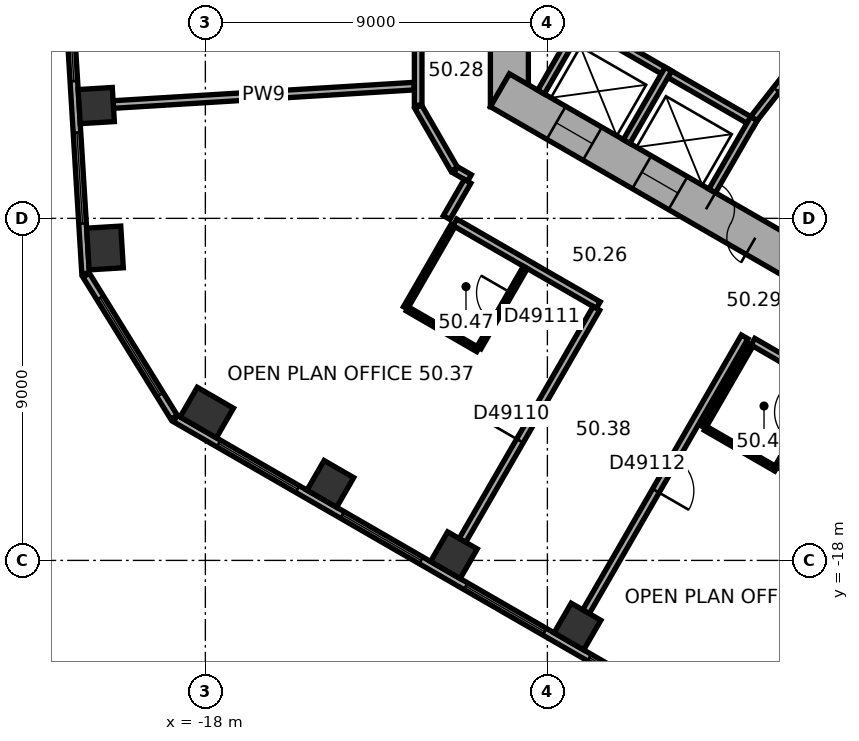
"""IFC4 building model, lengths in metres.
Left out: names, types, materials, properties, quantities, classifications, styles, units other than length and angle.
Written with IfcOpenShell. Run it as: python <this file> out.ifc"""

import sys

from ifc_helpers import new_model, si_unit, direction, frame, frame_2d, origin, origin_2d, place, context, subcontext, project, spatial, rectangle, extrude, element, fill, save


model = new_model("IFC4")
c1 = context("Model", 3, precision=1e-05, world=origin(), true_north=direction((0.0, 1.0)))
c2 = subcontext(c1, "Body", "Model", "MODEL_VIEW")
j1 = project(units=[si_unit("LENGTHUNIT", "METRE"), si_unit("PLANEANGLEUNIT", "RADIAN")], contexts=[c1])
p1 = place(None, origin())
s1 = spatial("IfcSite", under=j1, at=p1, CompositionType="ELEMENT")
p2 = place(p1, origin())
s2 = spatial("IfcBuilding", under=s1, at=p2, CompositionType="ELEMENT")
p3 = place(p2, frame((0.0, 0.0, 202.1)))
s3 = spatial("IfcBuildingStorey", under=s2, at=p3, CompositionType="ELEMENT", Elevation=202.1)
p4 = place(p3, frame((-20.871, -6.032, 0.0), z_axis=(0.0, 0.0, 1.0), x_axis=(0.061048539535, -0.998134798422, 0.0)))
e1 = element("IfcColumn", 1, at=p4, inside=s3, PredefinedType="COLUMN", context=c2, shape_type="SweptSolid", body=[
    extrude(rectangle(XDim=0.9, YDim=0.9, at=origin_2d()), origin(), (0.0, 0.0, 1.0), 3.7),
])
for number, where, z_axis, x_axis in (
    (2, (-20.642, -9.779, 0.0), (0.0, 0.0, 1.0), (0.061, -0.998, 0.0)),
    (3, (-17.962, -14.109, 0.0), (0.0, 0.0, 1.0), (0.866, -0.5, 0.0)),
):
    element("IfcColumn", number, at=place(p3, frame(where, z_axis=z_axis, x_axis=x_axis)), inside=s3, PredefinedType="COLUMN", context=c2, shape_type="SweptSolid", body=[
        extrude(rectangle(XDim=1.1, YDim=0.9, at=origin_2d()), origin(), (0.0, 0.0, 1.0), 3.7),
    ])
for number, where, z_axis, x_axis in (
    (4, (-14.711, -15.986, 0.0), (0.0, 0.0, 1.0), (0.866, -0.5, 0.0)),
    (5, (-11.46, -17.863, 0.0), (0.0, 0.0, 1.0), (0.866, -0.5, 0.0)),
    (6, (-8.208, -19.74, 0.0), (0.0, 0.0, 1.0), (0.866, -0.5, 0.0)),
):
    element("IfcColumn", number, at=place(p3, frame(where, z_axis=z_axis, x_axis=x_axis)), inside=s3, PredefinedType="COLUMN", context=c2, shape_type="SweptSolid", body=[
        extrude(rectangle(XDim=0.9, YDim=0.9, at=origin_2d()), origin(), (0.0, 0.0, 1.0), 3.7),
    ])
p5 = place(p3, frame((-10.0, 6.062, 0.0), z_axis=(0.0, 0.0, 1.0), x_axis=(0.0, -1.0, 0.0)))
e7 = element("IfcWall", 7, at=p5, inside=s3, PredefinedType="SHEAR", context=c2, shape_type="SweptSolid", body=[
    extrude(rectangle(XDim=12.125, YDim=1.0, at=frame_2d((6.062, 0.0))), origin(), (0.0, 0.0, 1.0), 3.7),
])
p6 = place(p5, frame((5.212, 0.0, 0.0)))
e8 = element("IfcOpeningElement", 8, at=p6, cuts=e7, PredefinedType="OPENING", context=c2, shape_type="SweptSolid", body=[
    extrude(rectangle(XDim=1.1, YDim=2.1, at=frame_2d((0.55, 1.05))), frame((0.0, 0.51, 0.0), z_axis=(0.0, -1.0, 0.0), x_axis=(1.0, 0.0, 0.0)), (0.0, 0.0, 1.0), 1.02),
])
p7 = place(p5, frame((7.812, 0.0, 0.0)))
e9 = element("IfcOpeningElement", 9, at=p7, cuts=e7, PredefinedType="OPENING", context=c2, shape_type="SweptSolid", body=[
    extrude(rectangle(XDim=1.1, YDim=2.1, at=frame_2d((0.55, 1.05))), frame((0.0, 0.51, 0.0), z_axis=(0.0, -1.0, 0.0), x_axis=(1.0, 0.0, 0.0)), (0.0, 0.0, 1.0), 1.02),
])
p8 = place(p3, frame((-10.25, -5.629, 0.0), z_axis=(0.0, 0.0, 1.0), x_axis=(0.866022616891, -0.50000482701, 0.0)))
e10 = element("IfcWall", 10, at=p8, inside=s3, PredefinedType="SHEAR", context=c2, shape_type="SweptSolid", body=[
    extrude(rectangle(XDim=12.125, YDim=1.0, at=frame_2d((6.062, 0.0))), origin(), (0.0, 0.0, 1.0), 3.7),
])
p9 = place(p8, frame((6.262, 0.0, 0.0)))
e11 = element("IfcOpeningElement", 11, at=p9, cuts=e10, PredefinedType="OPENING", context=c2, shape_type="SweptSolid", body=[
    extrude(rectangle(XDim=1.5, YDim=2.1, at=frame_2d((0.75, 1.05))), frame((0.0, 0.51, 0.0), z_axis=(0.0, -1.0, 0.0), x_axis=(1.0, 0.0, 0.0)), (0.0, 0.0, 1.0), 1.02),
])
p10 = place(p8, frame((1.712, 0.0, 0.0)))
e12 = element("IfcOpeningElement", 12, at=p10, cuts=e10, PredefinedType="OPENING", context=c2, shape_type="SweptSolid", body=[
    extrude(rectangle(XDim=1.1, YDim=2.1, at=frame_2d((0.55, 1.05))), frame((0.0, 0.51, 0.0), z_axis=(0.0, -1.0, 0.0), x_axis=(1.0, 0.0, 0.0)), (0.0, 0.0, 1.0), 1.02),
])
p11 = place(p8, frame((4.312, 0.0, 0.0)))
e13 = element("IfcOpeningElement", 13, at=p11, cuts=e10, PredefinedType="OPENING", context=c2, shape_type="SweptSolid", body=[
    extrude(rectangle(XDim=1.1, YDim=2.1, at=frame_2d((0.55, 1.05))), frame((0.0, 0.51, 0.0), z_axis=(0.0, -1.0, 0.0), x_axis=(1.0, 0.0, 0.0)), (0.0, 0.0, 1.0), 1.02),
])
p12 = place(p3, frame((-22.375, 9.557, 0.0), z_axis=(0.0, 0.0, 1.0), x_axis=(0.061036015339, -0.998135564356, 0.0)))
e14 = element("IfcWall", 14, at=p12, inside=s3, PredefinedType="STANDARD", context=c2, shape_type="SweptSolid", body=[
    extrude(rectangle(XDim=20.044, YDim=0.2, at=frame_2d((10.022, 0.0))), origin(), (0.0, 0.0, 1.0), 3.7),
])
p13 = place(p12, frame((1.313, 0.0, 0.9)))
e15 = element("IfcOpeningElement", 15, at=p13, cuts=e14, PredefinedType="OPENING", context=c2, shape_type="SweptSolid", body=[
    extrude(rectangle(XDim=2.4, YDim=2.0, at=frame_2d((1.2, 1.0))), frame((0.0, 0.11, 0.0), z_axis=(0.0, -1.0, 0.0), x_axis=(1.0, 0.0, 0.0)), (0.0, 0.0, 1.0), 0.22),
])
p14 = place(p12, frame((5.067, 0.0, 0.9)))
e16 = element("IfcOpeningElement", 16, at=p14, cuts=e14, PredefinedType="OPENING", context=c2, shape_type="SweptSolid", body=[
    extrude(rectangle(XDim=2.4, YDim=2.0, at=frame_2d((1.2, 1.0))), frame((0.0, 0.11, 0.0), z_axis=(0.0, -1.0, 0.0), x_axis=(1.0, 0.0, 0.0)), (0.0, 0.0, 1.0), 0.22),
])
p15 = place(p12, frame((8.821, 0.0, 0.9)))
e17 = element("IfcOpeningElement", 17, at=p15, cuts=e14, PredefinedType="OPENING", context=c2, shape_type="SweptSolid", body=[
    extrude(rectangle(XDim=2.4, YDim=2.0, at=frame_2d((1.2, 1.0))), frame((0.0, 0.11, 0.0), z_axis=(0.0, -1.0, 0.0), x_axis=(1.0, 0.0, 0.0)), (0.0, 0.0, 1.0), 0.22),
])
p16 = place(p12, frame((12.575, 0.0, 0.9)))
e18 = element("IfcOpeningElement", 18, at=p16, cuts=e14, PredefinedType="OPENING", context=c2, shape_type="SweptSolid", body=[
    extrude(rectangle(XDim=2.4, YDim=2.0, at=frame_2d((1.2, 1.0))), frame((0.0, 0.11, 0.0), z_axis=(0.0, -1.0, 0.0), x_axis=(1.0, 0.0, 0.0)), (0.0, 0.0, 1.0), 0.22),
])
p17 = place(p12, frame((16.329, 0.0, 0.9)))
e19 = element("IfcOpeningElement", 19, at=p17, cuts=e14, PredefinedType="OPENING", context=c2, shape_type="SweptSolid", body=[
    extrude(rectangle(XDim=2.4, YDim=2.0, at=frame_2d((1.2, 1.0))), frame((0.0, 0.11, 0.0), z_axis=(0.0, -1.0, 0.0), x_axis=(1.0, 0.0, 0.0)), (0.0, 0.0, 1.0), 0.22),
])
p18 = place(p3, frame((-21.137, -10.496, 0.0), z_axis=(0.0, 0.0, 1.0), x_axis=(0.526178661629, -0.850374044786, 0.0)))
e20 = element("IfcWall", 20, at=p18, inside=s3, PredefinedType="STANDARD", context=c2, shape_type="SweptSolid", body=[
    extrude(rectangle(XDim=4.395, YDim=0.2, at=frame_2d((2.197, 0.0))), origin(), (0.0, 0.0, 1.0), 3.7),
])
p19 = place(p18, frame((0.698, 0.0, 0.9)))
e21 = element("IfcOpeningElement", 21, at=p19, cuts=e20, PredefinedType="OPENING", context=c2, shape_type="SweptSolid", body=[
    extrude(rectangle(XDim=3.0, YDim=2.0, at=frame_2d((1.5, 1.0))), frame((0.0, 0.11, 0.0), z_axis=(0.0, -1.0, 0.0), x_axis=(1.0, 0.0, 0.0)), (0.0, 0.0, 1.0), 0.22),
])
p20 = place(p3, frame((-18.789, -14.267, 0.0), z_axis=(0.0, 0.0, 1.0), x_axis=(0.866023315909, -0.500003616288, 0.0)))
e22 = element("IfcWall", 22, at=p20, inside=s3, PredefinedType="STANDARD", context=c2, shape_type="SweptSolid", body=[
    extrude(rectangle(XDim=20.044, YDim=0.2, at=frame_2d((10.022, 0.0))), origin(), (0.0, 0.0, 1.0), 3.7),
])
p21 = place(p20, frame((1.314, 0.0, 0.9)))
e23 = element("IfcOpeningElement", 23, at=p21, cuts=e22, PredefinedType="OPENING", context=c2, shape_type="SweptSolid", body=[
    extrude(rectangle(XDim=2.4, YDim=2.0, at=frame_2d((1.2, 1.0))), frame((0.0, 0.11, 0.0), z_axis=(0.0, -1.0, 0.0), x_axis=(1.0, 0.0, 0.0)), (0.0, 0.0, 1.0), 0.22),
])
p22 = place(p20, frame((5.069, 0.0, 0.9)))
e24 = element("IfcOpeningElement", 24, at=p22, cuts=e22, PredefinedType="OPENING", context=c2, shape_type="SweptSolid", body=[
    extrude(rectangle(XDim=2.4, YDim=2.0, at=frame_2d((1.2, 1.0))), frame((0.0, 0.11, 0.0), z_axis=(0.0, -1.0, 0.0), x_axis=(1.0, 0.0, 0.0)), (0.0, 0.0, 1.0), 0.22),
])
p23 = place(p20, frame((8.823, 0.0, 0.9)))
e25 = element("IfcOpeningElement", 25, at=p23, cuts=e22, PredefinedType="OPENING", context=c2, shape_type="SweptSolid", body=[
    extrude(rectangle(XDim=2.4, YDim=2.0, at=frame_2d((1.2, 1.0))), frame((0.0, 0.11, 0.0), z_axis=(0.0, -1.0, 0.0), x_axis=(1.0, 0.0, 0.0)), (0.0, 0.0, 1.0), 0.22),
])
p24 = place(p20, frame((12.577, 0.0, 0.9)))
e26 = element("IfcOpeningElement", 26, at=p24, cuts=e22, PredefinedType="OPENING", context=c2, shape_type="SweptSolid", body=[
    extrude(rectangle(XDim=2.4, YDim=2.0, at=frame_2d((1.2, 1.0))), frame((0.0, 0.11, 0.0), z_axis=(0.0, -1.0, 0.0), x_axis=(1.0, 0.0, 0.0)), (0.0, 0.0, 1.0), 0.22),
])
p25 = place(p20, frame((16.331, 0.0, 0.9)))
e27 = element("IfcOpeningElement", 27, at=p25, cuts=e22, PredefinedType="OPENING", context=c2, shape_type="SweptSolid", body=[
    extrude(rectangle(XDim=2.4, YDim=2.0, at=frame_2d((1.2, 1.0))), frame((0.0, 0.11, 0.0), z_axis=(0.0, -1.0, 0.0), x_axis=(1.0, 0.0, 0.0)), (0.0, 0.0, 1.0), 0.22),
])
p26 = place(p3, frame((-8.203, -3.809, 0.0), z_axis=(0.0, 0.0, 1.0), x_axis=(0.866028230842, -0.499995103361, 0.0)))
e28 = element("IfcWall", 28, at=p26, inside=s3, PredefinedType="PARTITIONING", context=c2, shape_type="SweptSolid", body=[
    extrude(rectangle(XDim=5.4, YDim=0.2, at=frame_2d((2.7, 0.0))), origin(), (0.0, 0.0, 1.0), 3.35),
])
for number, where, z_axis, x_axis in (
    (29, (-8.067, -3.772, 0.0), (0.0, 0.0, 1.0), (-0.5, -0.866, 0.0)),
    (30, (-5.815, -5.072, 0.0), (0.0, 0.0, 1.0), (-0.5, -0.866, 0.0)),
):
    element("IfcWall", number, at=place(p3, frame(where, z_axis=z_axis, x_axis=x_axis)), inside=s3, PredefinedType="PARTITIONING", context=c2, shape_type="SweptSolid", body=[
        extrude(rectangle(XDim=2.2, YDim=0.2, at=frame_2d((1.1, 0.0))), origin(), (0.0, 0.0, 1.0), 3.35),
    ])
p27 = place(p3, frame((-3.563, -6.372, 0.0), z_axis=(0.0, 0.0, 1.0), x_axis=(-0.499994660107, -0.866028486751, 0.0)))
e31 = element("IfcWall", 31, at=p27, inside=s3, PredefinedType="PARTITIONING", context=c2, shape_type="SweptSolid", body=[
    extrude(rectangle(XDim=2.2, YDim=0.2, at=frame_2d((1.1, 0.0))), origin(), (0.0, 0.0, 1.0), 3.35),
])
p28 = place(p3, frame((-1.712, -4.008, 0.0), z_axis=(0.0, 0.0, 1.0), x_axis=(-0.616549420702, -0.787316208287, 0.0)))
e32 = element("IfcWall", 32, at=p28, inside=s3, PredefinedType="PARTITIONING", context=c2, shape_type="SweptSolid", body=[
    extrude(rectangle(XDim=3.002, YDim=0.2, at=frame_2d((1.501, 0.0))), origin(), (0.0, 0.0, 1.0), 3.35),
])
p29 = place(p28, frame((1.15, 0.0, 0.0)))
e33 = element("IfcOpeningElement", 33, at=p29, cuts=e32, PredefinedType="OPENING", context=c2, shape_type="SweptSolid", body=[
    extrude(rectangle(XDim=0.9, YDim=2.1, at=frame_2d((0.45, 1.05))), frame((0.0, 0.11, 0.0), z_axis=(0.0, -1.0, 0.0), x_axis=(1.0, 0.0, 0.0)), (0.0, 0.0, 1.0), 0.22),
])
p30 = place(p3, frame((-20.421, -6.005, 0.0), z_axis=(0.0, 0.0, 1.0), x_axis=(0.998134865741, 0.061047438866, 0.0)))
e34 = element("IfcWall", 34, at=p30, inside=s3, PredefinedType="PARTITIONING", context=c2, shape_type="SweptSolid", body=[
    extrude(rectangle(XDim=7.927, YDim=0.2, at=frame_2d((3.963, 0.0))), origin(), (0.0, 0.0, 1.0), 2.55),
])
p31 = place(p3, frame((-12.735, -11.355, 0.0), z_axis=(0.0, 0.0, 1.0), x_axis=(0.500004234368, 0.866022959057, 0.0)))
e35 = element("IfcWall", 35, at=p31, inside=s3, PredefinedType="PARTITIONING", context=c2, shape_type="SweptSolid", body=[
    extrude(rectangle(XDim=2.5, YDim=0.12, at=frame_2d((1.25, 0.0))), origin(), (0.0, 0.0, 1.0), 3.35),
])
p32 = place(p3, frame((-12.4, -6.062, 0.0), z_axis=(0.0, 0.0, 1.0), x_axis=(0.500022797313, -0.86601224135, 0.0)))
e36 = element("IfcWall", 36, at=p32, inside=s3, PredefinedType="PARTITIONING", context=c2, shape_type="SweptSolid", body=[
    extrude(rectangle(XDim=1.9, YDim=0.2, at=frame_2d((0.95, 0.0))), origin(), (0.0, 0.0, 1.0), 3.35),
])
p33 = place(p3, frame((-12.4, -4.201, 0.0), z_axis=(0.0, 0.0, 1.0), x_axis=(0.0, -1.0, 0.0)))
e37 = element("IfcWall", 37, at=p33, inside=s3, PredefinedType="PARTITIONING", context=c2, shape_type="SweptSolid", body=[
    extrude(rectangle(XDim=1.821, YDim=0.2, at=frame_2d((0.911, 0.0))), origin(), (0.0, 0.0, 1.0), 3.35),
])
p34 = place(p3, frame((-11.435, -9.103, 0.0), z_axis=(0.0, 0.0, 1.0), x_axis=(0.866007399799, -0.500031182522, 0.0)))
e38 = element("IfcWall", 38, at=p34, inside=s3, PredefinedType="PARTITIONING", context=c2, shape_type="SweptSolid", body=[
    extrude(rectangle(XDim=4.358, YDim=0.2, at=frame_2d((2.179, 0.0))), origin(), (0.0, 0.0, 1.0), 3.35),
])
p35 = place(p3, frame((-11.415, -7.728, 0.0), z_axis=(0.0, 0.0, 1.0), x_axis=(0.865915281873, -0.500190688257, 0.0)))
e39 = element("IfcWall", 39, at=p35, inside=s3, PredefinedType="PARTITIONING", context=c2, shape_type="SweptSolid", body=[
    extrude(rectangle(XDim=0.421, YDim=0.2, at=frame_2d((0.21, 0.0))), origin(), (0.0, 0.0, 1.0), 3.35),
])
p36 = place(p3, frame((-11.235, -17.474, 0.0), z_axis=(0.0, 0.0, 1.0), x_axis=(0.500009260695, 0.866020057054, 0.0)))
e40 = element("IfcWall", 40, at=p36, inside=s3, PredefinedType="PARTITIONING", context=c2, shape_type="SweptSolid", body=[
    extrude(rectangle(XDim=7.049, YDim=0.2, at=frame_2d((3.524, 0.0))), origin(), (0.0, 0.0, 1.0), 2.55),
])
p37 = place(p36, frame((3.024, 0.0, 0.0)))
e41 = element("IfcOpeningElement", 41, at=p37, cuts=e40, PredefinedType="OPENING", context=c2, shape_type="SweptSolid", body=[
    extrude(rectangle(XDim=1.0, YDim=2.1, at=frame_2d((0.5, 1.05))), frame((0.0, 0.11, 0.0), z_axis=(0.0, -1.0, 0.0), x_axis=(1.0, 0.0, 0.0)), (0.0, 0.0, 1.0), 0.22),
])
p38 = place(p3, frame((-11.101, -8.025, 0.0), z_axis=(0.0, 0.0, 1.0), x_axis=(-0.500074377092, -0.865982457891, 0.0)))
e42 = element("IfcWall", 42, at=p38, inside=s3, PredefinedType="PARTITIONING", context=c2, shape_type="SweptSolid", body=[
    extrude(rectangle(XDim=1.101, YDim=0.2, at=frame_2d((0.55, 0.0))), origin(), (0.0, 0.0, 1.0), 3.35),
])
p39 = place(p3, frame((-10.829, -12.455, 0.0), z_axis=(0.0, 0.0, 1.0), x_axis=(-0.86600889856, 0.500028586798, 0.0)))
e43 = element("IfcWall", 43, at=p39, inside=s3, PredefinedType="PARTITIONING", context=c2, shape_type="SweptSolid", body=[
    extrude(rectangle(XDim=2.14, YDim=0.12, at=frame_2d((1.07, 0.0))), origin(), (0.0, 0.0, 1.0), 3.35),
])
p40 = place(p3, frame((-9.579, -10.29, 0.0), z_axis=(0.0, 0.0, 1.0), x_axis=(-0.499959183527, -0.866048967903, 0.0)))
e44 = element("IfcWall", 44, at=p40, inside=s3, PredefinedType="PARTITIONING", context=c2, shape_type="SweptSolid", body=[
    extrude(rectangle(XDim=2.44, YDim=0.12, at=frame_2d((1.22, 0.0))), origin(), (0.0, 0.0, 1.0), 3.35),
])
p41 = place(p40, frame((0.77, 0.0, 0.0)))
e45 = element("IfcOpeningElement", 45, at=p41, cuts=e44, PredefinedType="OPENING", context=c2, shape_type="SweptSolid", body=[
    extrude(rectangle(XDim=0.9, YDim=2.1, at=frame_2d((0.45, 1.05))), frame((0.0, 0.07, 0.0), z_axis=(0.0, -1.0, 0.0), x_axis=(1.0, 0.0, 0.0)), (0.0, 0.0, 1.0), 0.14),
])
p42 = place(p3, frame((-7.984, -19.351, 0.0), z_axis=(0.0, 0.0, 1.0), x_axis=(0.500010139422, 0.866019549707, 0.0)))
e46 = element("IfcWall", 46, at=p42, inside=s3, PredefinedType="PARTITIONING", context=c2, shape_type="SweptSolid", body=[
    extrude(rectangle(XDim=8.35, YDim=0.2, at=frame_2d((4.175, 0.0))), origin(), (0.0, 0.0, 1.0), 3.35),
])
p43 = place(p42, frame((3.675, 0.0, 0.0)))
e47 = element("IfcOpeningElement", 47, at=p43, cuts=e46, PredefinedType="OPENING", context=c2, shape_type="SweptSolid", body=[
    extrude(rectangle(XDim=1.0, YDim=2.1, at=frame_2d((0.5, 1.05))), frame((0.0, 0.11, 0.0), z_axis=(0.0, -1.0, 0.0), x_axis=(1.0, 0.0, 0.0)), (0.0, 0.0, 1.0), 0.22),
])
p44 = place(p3, frame((-4.892, -14.496, 0.0), z_axis=(0.0, 0.0, 1.0), x_axis=(0.500004234368, 0.866022959057, 0.0)))
e48 = element("IfcWall", 48, at=p44, inside=s3, PredefinedType="PARTITIONING", context=c2, shape_type="SweptSolid", body=[
    extrude(rectangle(XDim=2.5, YDim=0.12, at=frame_2d((1.25, 0.0))), origin(), (0.0, 0.0, 1.0), 3.35),
])
p45 = place(p3, frame((-3.592, -12.244, 0.0), z_axis=(0.0, 0.0, 1.0), x_axis=(0.866028335764, -0.499994921628, 0.0)))
e49 = element("IfcWall", 49, at=p45, inside=s3, PredefinedType="PARTITIONING", context=c2, shape_type="SweptSolid", body=[
    extrude(rectangle(XDim=3.051, YDim=0.2, at=frame_2d((1.525, 0.0))), origin(), (0.0, 0.0, 1.0), 3.35),
])
p46 = place(p3, frame((-2.987, -15.596, 0.0), z_axis=(0.0, 0.0, 1.0), x_axis=(-0.86600889856, 0.500028586798, 0.0)))
e50 = element("IfcWall", 50, at=p46, inside=s3, PredefinedType="PARTITIONING", context=c2, shape_type="SweptSolid", body=[
    extrude(rectangle(XDim=2.14, YDim=0.12, at=frame_2d((1.07, 0.0))), origin(), (0.0, 0.0, 1.0), 3.35),
])
p47 = place(p3, frame((-1.737, -13.431, 0.0), z_axis=(0.0, 0.0, 1.0), x_axis=(-0.499959183527, -0.866048967903, 0.0)))
e51 = element("IfcWall", 51, at=p47, inside=s3, PredefinedType="PARTITIONING", context=c2, shape_type="SweptSolid", body=[
    extrude(rectangle(XDim=2.44, YDim=0.12, at=frame_2d((1.22, 0.0))), origin(), (0.0, 0.0, 1.0), 3.35),
])
p48 = place(p47, frame((0.77, 0.0, 0.0)))
e52 = element("IfcOpeningElement", 52, at=p48, cuts=e51, PredefinedType="OPENING", context=c2, shape_type="SweptSolid", body=[
    extrude(rectangle(XDim=0.9, YDim=2.1, at=frame_2d((0.45, 1.05))), frame((0.0, 0.07, 0.0), z_axis=(0.0, -1.0, 0.0), x_axis=(1.0, 0.0, 0.0)), (0.0, 0.0, 1.0), 0.14),
])
p49 = place(p16, origin())
e53 = element("IfcWindow", 53, at=p49, inside=s3, PartitioningType="SINGLE_PANEL", PredefinedType="WINDOW", context=c2, shape_type="SweptSolid", body=[
    extrude(rectangle(XDim=2.4, YDim=2.0, at=frame_2d((1.2, 1.0))), frame((0.0, 0.03, 0.0), z_axis=(0.0, -1.0, 0.0), x_axis=(1.0, 0.0, 0.0)), (0.0, 0.0, 1.0), 0.06),
])
fill(e18, e53)
p50 = place(p17, origin())
e54 = element("IfcWindow", 54, at=p50, inside=s3, PartitioningType="SINGLE_PANEL", PredefinedType="WINDOW", context=c2, shape_type="SweptSolid", body=[
    extrude(rectangle(XDim=2.4, YDim=2.0, at=frame_2d((1.2, 1.0))), frame((0.0, 0.03, 0.0), z_axis=(0.0, -1.0, 0.0), x_axis=(1.0, 0.0, 0.0)), (0.0, 0.0, 1.0), 0.06),
])
fill(e19, e54)
p51 = place(p19, origin())
e55 = element("IfcWindow", 55, at=p51, inside=s3, PartitioningType="SINGLE_PANEL", PredefinedType="WINDOW", context=c2, shape_type="SweptSolid", body=[
    extrude(rectangle(XDim=3.0, YDim=2.0, at=frame_2d((1.5, 1.0))), frame((0.0, 0.03, 0.0), z_axis=(0.0, -1.0, 0.0), x_axis=(1.0, 0.0, 0.0)), (0.0, 0.0, 1.0), 0.06),
])
fill(e21, e55)
p52 = place(p21, origin())
e56 = element("IfcWindow", 56, at=p52, inside=s3, PartitioningType="SINGLE_PANEL", PredefinedType="WINDOW", context=c2, shape_type="SweptSolid", body=[
    extrude(rectangle(XDim=2.4, YDim=2.0, at=frame_2d((1.2, 1.0))), frame((0.0, 0.03, 0.0), z_axis=(0.0, -1.0, 0.0), x_axis=(1.0, 0.0, 0.0)), (0.0, 0.0, 1.0), 0.06),
])
fill(e23, e56)
p53 = place(p22, origin())
e57 = element("IfcWindow", 57, at=p53, inside=s3, PartitioningType="SINGLE_PANEL", PredefinedType="WINDOW", context=c2, shape_type="SweptSolid", body=[
    extrude(rectangle(XDim=2.4, YDim=2.0, at=frame_2d((1.2, 1.0))), frame((0.0, 0.03, 0.0), z_axis=(0.0, -1.0, 0.0), x_axis=(1.0, 0.0, 0.0)), (0.0, 0.0, 1.0), 0.06),
])
fill(e24, e57)
p54 = place(p23, origin())
e58 = element("IfcWindow", 58, at=p54, inside=s3, PartitioningType="SINGLE_PANEL", PredefinedType="WINDOW", context=c2, shape_type="SweptSolid", body=[
    extrude(rectangle(XDim=2.4, YDim=2.0, at=frame_2d((1.2, 1.0))), frame((0.0, 0.03, 0.0), z_axis=(0.0, -1.0, 0.0), x_axis=(1.0, 0.0, 0.0)), (0.0, 0.0, 1.0), 0.06),
])
fill(e25, e58)
p55 = place(p24, origin())
e59 = element("IfcWindow", 59, at=p55, inside=s3, PartitioningType="SINGLE_PANEL", PredefinedType="WINDOW", context=c2, shape_type="SweptSolid", body=[
    extrude(rectangle(XDim=2.4, YDim=2.0, at=frame_2d((1.2, 1.0))), frame((0.0, 0.03, 0.0), z_axis=(0.0, -1.0, 0.0), x_axis=(1.0, 0.0, 0.0)), (0.0, 0.0, 1.0), 0.06),
])
fill(e26, e59)
p56 = place(p9, origin())
e60 = element("IfcDoor", 60, at=p56, inside=s3, OperationType="DOUBLE_DOOR_SINGLE_SWING", PredefinedType="DOOR", context=c2, shape_type="SweptSolid", body=[
    extrude(rectangle(XDim=1.5, YDim=2.1, at=frame_2d((0.75, 1.05))), frame((0.0, 0.025, 0.0), z_axis=(0.0, -1.0, 0.0), x_axis=(1.0, 0.0, 0.0)), (0.0, 0.0, 1.0), 0.05),
])
fill(e11, e60)
p57 = place(p29, origin())
e61 = element("IfcDoor", 61, at=p57, inside=s3, OperationType="SINGLE_SWING_LEFT", PredefinedType="DOOR", context=c2, shape_type="SweptSolid", body=[
    extrude(rectangle(XDim=0.9, YDim=2.1, at=frame_2d((0.45, 1.05))), frame((0.0, 0.025, 0.0), z_axis=(0.0, -1.0, 0.0), x_axis=(1.0, 0.0, 0.0)), (0.0, 0.0, 1.0), 0.05),
])
fill(e33, e61)
p58 = place(p10, origin())
e62 = element("IfcDoor", 62, at=p58, inside=s3, OperationType="DOUBLE_DOOR_SLIDING", PredefinedType="DOOR", context=c2, shape_type="SweptSolid", body=[
    extrude(rectangle(XDim=1.1, YDim=2.1, at=frame_2d((0.55, 1.05))), frame((0.0, 0.025, 0.0), z_axis=(0.0, -1.0, 0.0), x_axis=(1.0, 0.0, 0.0)), (0.0, 0.0, 1.0), 0.05),
])
fill(e12, e62)
p59 = place(p11, origin())
e63 = element("IfcDoor", 63, at=p59, inside=s3, OperationType="DOUBLE_DOOR_SLIDING", PredefinedType="DOOR", context=c2, shape_type="SweptSolid", body=[
    extrude(rectangle(XDim=1.1, YDim=2.1, at=frame_2d((0.55, 1.05))), frame((0.0, 0.025, 0.0), z_axis=(0.0, -1.0, 0.0), x_axis=(1.0, 0.0, 0.0)), (0.0, 0.0, 1.0), 0.05),
])
fill(e13, e63)
p60 = place(p37, origin())
e64 = element("IfcDoor", 64, at=p60, inside=s3, OperationType="SINGLE_SWING_LEFT", PredefinedType="DOOR", context=c2, shape_type="SweptSolid", body=[
    extrude(rectangle(XDim=1.0, YDim=2.1, at=frame_2d((0.5, 1.05))), frame((0.0, 0.025, 0.0), z_axis=(0.0, -1.0, 0.0), x_axis=(1.0, 0.0, 0.0)), (0.0, 0.0, 1.0), 0.05),
])
fill(e41, e64)
p61 = place(p41, origin())
e65 = element("IfcDoor", 65, at=p61, inside=s3, OperationType="SINGLE_SWING_LEFT", PredefinedType="DOOR", context=c2, shape_type="SweptSolid", body=[
    extrude(rectangle(XDim=0.9, YDim=2.1, at=frame_2d((0.45, 1.05))), frame((0.0, 0.025, 0.0), z_axis=(0.0, -1.0, 0.0), x_axis=(1.0, 0.0, 0.0)), (0.0, 0.0, 1.0), 0.05),
])
fill(e45, e65)
p62 = place(p43, origin())
e66 = element("IfcDoor", 66, at=p62, inside=s3, OperationType="SINGLE_SWING_LEFT", PredefinedType="DOOR", context=c2, shape_type="SweptSolid", body=[
    extrude(rectangle(XDim=1.0, YDim=2.1, at=frame_2d((0.5, 1.05))), frame((0.0, 0.025, 0.0), z_axis=(0.0, -1.0, 0.0), x_axis=(1.0, 0.0, 0.0)), (0.0, 0.0, 1.0), 0.05),
])
fill(e47, e66)
save(model, sys.argv[1])
